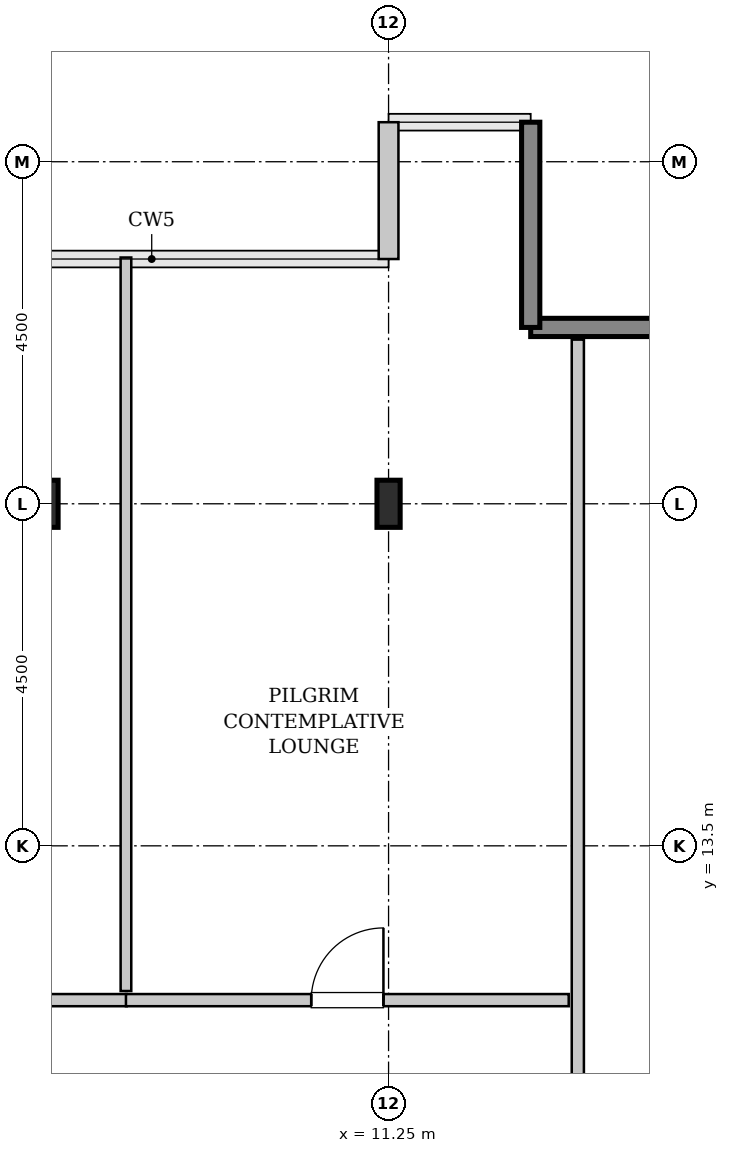
"""IFC4 building model, lengths in metres.
Left out: names, types, materials, properties, quantities, classifications, styles, units other than length and angle.
Written with IfcOpenShell. Run it as: python <this file> out.ifc"""

import sys

from ifc_helpers import new_model, si_unit, direction, frame, frame_2d, origin, origin_2d, place, context, subcontext, project, spatial, rectangle, i_section, extrude, source, transform, mapped, element, fill, save


model = new_model("IFC4")
c1 = context("Model", 3, precision=1e-05, world=origin(), true_north=direction((0.0, 1.0)))
c2 = subcontext(c1, "Body", "Model", "MODEL_VIEW")
j1 = project(units=[si_unit("LENGTHUNIT", "METRE"), si_unit("PLANEANGLEUNIT", "RADIAN")], contexts=[c1])
p1 = place(None, origin())
s1 = spatial("IfcSite", under=j1, at=p1, CompositionType="ELEMENT")
p2 = place(p1, origin())
s2 = spatial("IfcBuilding", under=s1, at=p2, CompositionType="ELEMENT")
p3 = place(p2, frame((0.0, 0.0, 287.4)))
s3 = spatial("IfcBuildingStorey", under=s2, at=p3, CompositionType="ELEMENT", Elevation=287.4)
m1 = source(origin(), c2, "Body", "SweptSolid", [
    extrude(i_section(OverallWidth=0.305, OverallDepth=0.62, WebThickness=0.021, FlangeThickness=0.04, FilletRadius=0.027, at=origin_2d()), origin(), (0.0, 0.0, 1.0), 3.8),
])
for number, where, z_axis, x_axis in (
    (1, (6.75, 18.0, 0.0), (0.0, 0.0, 1.0), (1.0, 0.0, 0.0)),
    (2, (11.25, 18.0, 0.0), (0.0, 0.0, 1.0), (1.0, 0.0, 0.0)),
):
    element("IfcColumn", number, at=place(p3, frame(where, z_axis=z_axis, x_axis=x_axis)), inside=s3, PredefinedType="COLUMN", context=c2, shape_type="MappedRepresentation", body=[
        mapped(m1, transform((0.0, 0.0, 0.0), x_axis=(1.0, 0.0, 0.0), y_axis=(0.0, 1.0, 0.0), z_axis=(0.0, 0.0, 1.0), scale=1.0)),
    ])
m2 = source(origin(), c2, "Body", "SweptSolid", [
    extrude(rectangle(XDim=2.7, YDim=0.24, at=frame_2d((1.35, 0.0))), origin(), (0.0, 0.0, 1.0), 3.55),
])
for number, where, z_axis, x_axis in (
    (3, (15.82, 20.32, 0.0), (0.0, 0.0, 1.0), (-1.0, 0.0, 0.0)),
    (4, (13.12, 20.32, 0.0), (0.0, 0.0, 1.0), (0.0, 1.0, 0.0)),
):
    element("IfcWall", number, at=place(p3, frame(where, z_axis=z_axis, x_axis=x_axis)), inside=s3, PredefinedType="SHEAR", context=c2, shape_type="MappedRepresentation", body=[
        mapped(m2, transform((0.0, 0.0, 0.0), x_axis=(1.0, 0.0, 0.0), y_axis=(0.0, 1.0, 0.0), z_axis=(0.0, 0.0, 1.0), scale=1.0)),
    ])
m3 = source(origin(), c2, "Body", "SweptSolid", [
    extrude(rectangle(XDim=1.8, YDim=0.26, at=frame_2d((0.9, 0.0))), origin(), (0.0, 0.0, 1.0), 3.55),
])
p4 = place(p3, frame((11.25, 23.02, 0.0), z_axis=(0.0, 0.0, 1.0), x_axis=(0.0, -1.0, 0.0)))
e5 = element("IfcWall", 5, at=p4, inside=s3, PredefinedType="SOLIDWALL", context=c2, shape_type="MappedRepresentation", body=[
    mapped(m3, transform((0.0, 0.0, 0.0), x_axis=(1.0, 0.0, 0.0), y_axis=(0.0, 1.0, 0.0), z_axis=(0.0, 0.0, 1.0), scale=1.0)),
])
m4 = source(origin(), c2, "Body", "SweptSolid", [
    extrude(rectangle(XDim=11.665, YDim=0.16, at=frame_2d((5.833, 0.0))), origin(), (0.0, 0.0, 1.0), 3.535),
])
p5 = place(p3, frame((13.74, 8.495, 0.0), z_axis=(0.0, 0.0, 1.0), x_axis=(0.0, 1.0, 0.0)))
e6 = element("IfcWall", 6, at=p5, inside=s3, PredefinedType="PARTITIONING", context=c2, shape_type="MappedRepresentation", body=[
    mapped(m4, transform((0.0, 0.0, 0.0), x_axis=(1.0, 0.0, 0.0), y_axis=(0.0, 1.0, 0.0), z_axis=(0.0, 0.0, 1.0), scale=1.0)),
])
p6 = place(p5, frame((1.032, 0.0, 0.0)))
e7 = element("IfcOpeningElement", 7, at=p6, cuts=e6, PredefinedType="OPENING", context=c2, shape_type="SweptSolid", body=[
    extrude(rectangle(XDim=0.95, YDim=2.1, at=frame_2d((0.475, 1.05))), frame((0.0, 0.09, 0.0), z_axis=(0.0, -1.0, 0.0), x_axis=(1.0, 0.0, 0.0)), (0.0, 0.0, 1.0), 0.18),
])
m5 = source(origin(), c2, "Body", "SweptSolid", [
    extrude(rectangle(XDim=6.01, YDim=0.16, at=frame_2d((3.005, 0.0))), origin(), (0.0, 0.0, 1.0), 3.535),
])
p7 = place(p3, frame((1.795, 11.47, 0.0), z_axis=(0.0, 0.0, 1.0), x_axis=(1.0, 0.0, 0.0)))
e8 = element("IfcWall", 8, at=p7, inside=s3, PredefinedType="PARTITIONING", context=c2, shape_type="MappedRepresentation", body=[
    mapped(m5, transform((0.0, 0.0, 0.0), x_axis=(1.0, 0.0, 0.0), y_axis=(0.0, 1.0, 0.0), z_axis=(0.0, 0.0, 1.0), scale=1.0)),
])
p8 = place(p7, frame((2.53, 0.0, 0.0)))
e9 = element("IfcOpeningElement", 9, at=p8, cuts=e8, PredefinedType="OPENING", context=c2, shape_type="SweptSolid", body=[
    extrude(rectangle(XDim=0.95, YDim=2.1, at=frame_2d((0.475, 1.05))), frame((0.0, 0.09, 0.0), z_axis=(0.0, -1.0, 0.0), x_axis=(1.0, 0.0, 0.0)), (0.0, 0.0, 1.0), 0.18),
])
m6 = source(origin(), c2, "Body", "SweptSolid", [
    extrude(rectangle(XDim=9.65, YDim=0.14, at=frame_2d((4.825, 0.0))), origin(), (0.0, 0.0, 1.0), 3.535),
])
p9 = place(p3, frame((7.795, 11.59, 0.0), z_axis=(0.0, 0.0, 1.0), x_axis=(0.0, 1.0, 0.0)))
e10 = element("IfcWall", 10, at=p9, inside=s3, PredefinedType="PARTITIONING", context=c2, shape_type="MappedRepresentation", body=[
    mapped(m6, transform((0.0, 0.0, 0.0), x_axis=(1.0, 0.0, 0.0), y_axis=(0.0, 1.0, 0.0), z_axis=(0.0, 0.0, 1.0), scale=1.0)),
])
m7 = source(origin(), c2, "Body", "SweptSolid", [
    extrude(rectangle(XDim=5.825, YDim=0.16, at=frame_2d((2.913, 0.0))), origin(), (0.0, 0.0, 1.0), 3.535),
])
p10 = place(p3, frame((7.795, 11.47, 0.0), z_axis=(0.0, 0.0, 1.0), x_axis=(1.0, 0.0, 0.0)))
e11 = element("IfcWall", 11, at=p10, inside=s3, PredefinedType="PARTITIONING", context=c2, shape_type="MappedRepresentation", body=[
    mapped(m7, transform((0.0, 0.0, 0.0), x_axis=(1.0, 0.0, 0.0), y_axis=(0.0, 1.0, 0.0), z_axis=(0.0, 0.0, 1.0), scale=1.0)),
])
p11 = place(p10, frame((2.438, 0.0, 0.0)))
e12 = element("IfcOpeningElement", 12, at=p11, cuts=e11, PredefinedType="OPENING", context=c2, shape_type="SweptSolid", body=[
    extrude(rectangle(XDim=0.95, YDim=2.1, at=frame_2d((0.475, 1.05))), frame((0.0, 0.09, 0.0), z_axis=(0.0, -1.0, 0.0), x_axis=(1.0, 0.0, 0.0)), (0.0, 0.0, 1.0), 0.18),
])
m8 = source(origin(), c2, "Body", "SweptSolid", [
    extrude(rectangle(XDim=0.95, YDim=2.1, at=frame_2d((0.475, 1.05))), frame((0.0, 0.025, 0.0), z_axis=(0.0, -1.0, 0.0), x_axis=(1.0, 0.0, 0.0)), (0.0, 0.0, 1.0), 0.05),
])
p12 = place(p11, origin())
e13 = element("IfcDoor", 13, at=p12, inside=s3, OperationType="SINGLE_SWING_RIGHT", PredefinedType="DOOR", context=c2, shape_type="MappedRepresentation", body=[
    mapped(m8, transform((0.0, 0.0, 0.0), x_axis=(1.0, 0.0, 0.0), y_axis=(0.0, 1.0, 0.0), z_axis=(0.0, 0.0, 1.0), scale=1.0)),
])
fill(e12, e13)
save(model, sys.argv[1])
